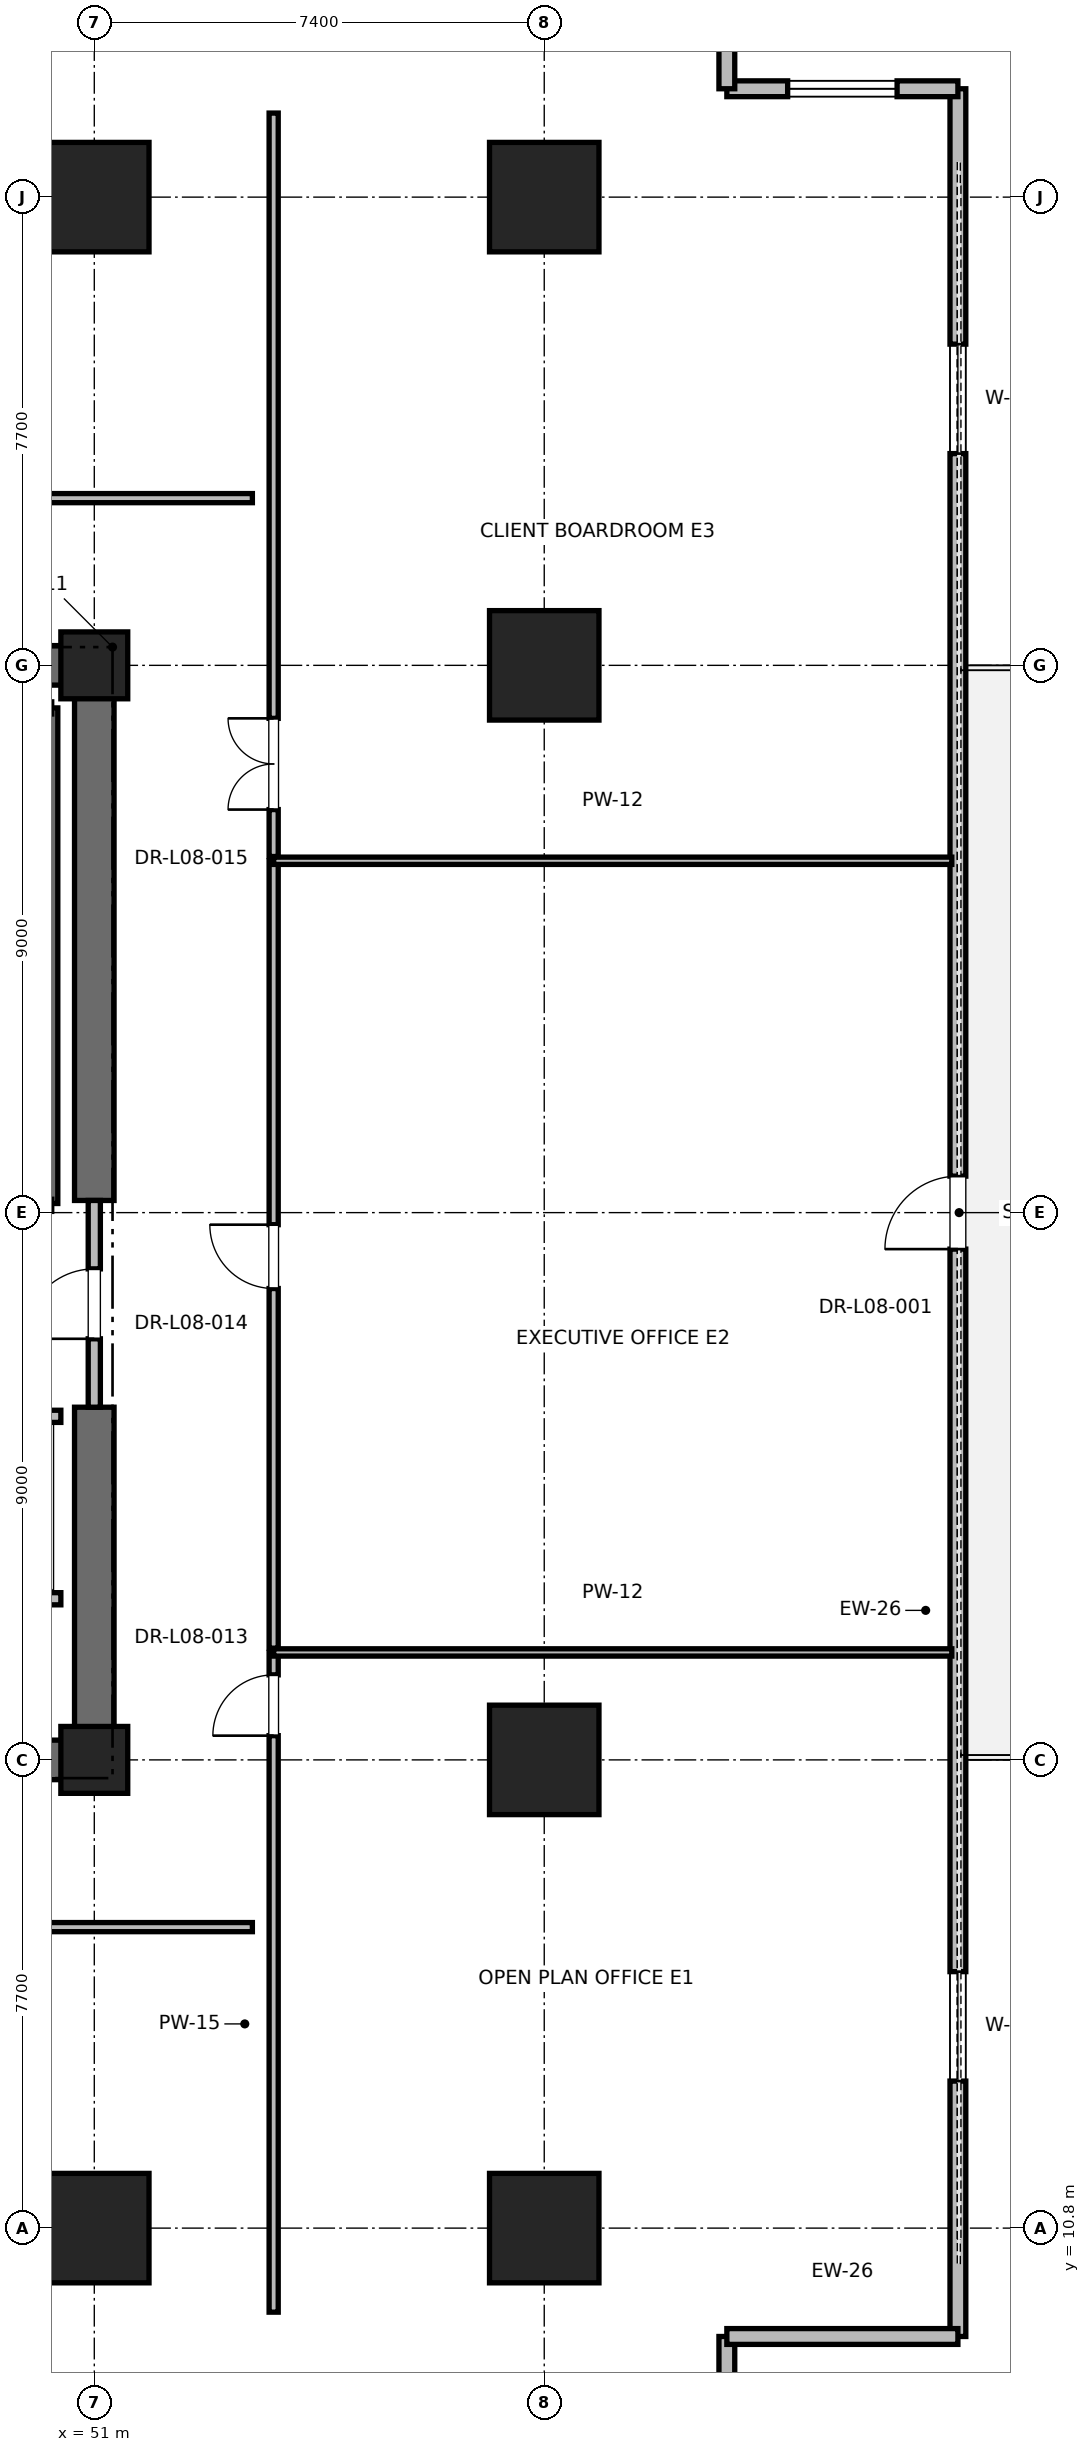
"""IFC4 building model, lengths in metres.
Left out: names, types, materials, properties, quantities, classifications, styles, units other than length and angle.
Written with IfcOpenShell. Run it as: python <this file> out.ifc"""

import sys

from ifc_helpers import new_model, si_unit, direction, frame, frame_2d, origin, origin_2d, place, context, subcontext, project, spatial, rectangle, extrude, element, fill, save


model = new_model("IFC4")
c1 = context("Model", 3, precision=1e-05, world=origin(), true_north=direction((0.0, 1.0)))
c2 = subcontext(c1, "Body", "Model", "MODEL_VIEW")
j1 = project(units=[si_unit("LENGTHUNIT", "METRE"), si_unit("PLANEANGLEUNIT", "RADIAN")], contexts=[c1])
p1 = place(None, origin())
s1 = spatial("IfcSite", under=j1, at=p1, CompositionType="ELEMENT")
p2 = place(p1, origin())
s2 = spatial("IfcBuilding", under=s1, at=p2, CompositionType="ELEMENT")
p3 = place(p2, frame((0.0, 0.0, 39.6)))
s3 = spatial("IfcBuildingStorey", under=s2, at=p3, CompositionType="ELEMENT", Elevation=39.6)
for number, where, z_axis, x_axis in (
    (1, (51.0, 10.8, 0.0), (0.0, 0.0, 1.0), (1.0, 0.0, 0.0)),
    (2, (51.0, 44.2, 0.0), (0.0, 0.0, 1.0), (1.0, 0.0, 0.0)),
    (3, (58.4, 18.5, 0.0), (0.0, 0.0, 1.0), (1.0, 0.0, 0.0)),
    (4, (58.4, 36.5, 0.0), (0.0, 0.0, 1.0), (1.0, 0.0, 0.0)),
    (5, (58.4, 10.8, 0.0), (0.0, 0.0, 1.0), (1.0, 0.0, 0.0)),
    (6, (58.4, 44.2, 0.0), (0.0, 0.0, 1.0), (1.0, 0.0, 0.0)),
):
    element("IfcColumn", number, at=place(p3, frame(where, z_axis=z_axis, x_axis=x_axis)), inside=s3, PredefinedType="COLUMN", context=c2, shape_type="SweptSolid", body=[
        extrude(rectangle(XDim=1.8, YDim=1.8, at=origin_2d()), origin(), (0.0, 0.0, 1.0), 4.0),
    ])
for number, where, z_axis, x_axis in (
    (7, (51.0, 18.5, 0.0), (0.0, 0.0, 1.0), (1.0, 0.0, 0.0)),
    (8, (51.0, 36.5, 0.0), (0.0, 0.0, 1.0), (1.0, 0.0, 0.0)),
):
    element("IfcColumn", number, at=place(p3, frame(where, z_axis=z_axis, x_axis=x_axis)), inside=s3, PredefinedType="PILASTER", context=c2, shape_type="SweptSolid", body=[
        extrude(rectangle(XDim=1.1, YDim=1.1, at=origin_2d()), origin(), (0.0, 0.0, 1.0), 4.0),
    ])
p4 = place(p3, frame((41.8, 18.5, 0.0), z_axis=(0.0, 0.0, 1.0), x_axis=(1.0, 0.0, 0.0)))
e9 = element("IfcWall", 9, at=p4, inside=s3, PredefinedType="SHEAR", context=c2, shape_type="SweptSolid", body=[
    extrude(rectangle(XDim=9.2, YDim=0.65, at=frame_2d((4.6, 0.0))), origin(), (0.0, 0.0, 1.0), 3.76),
])
for number, where, z_axis, x_axis in (
    (10, (45.2, 36.5, 0.0), (0.0, 0.0, 1.0), (1.0, 0.0, 0.0)),
    (11, (51.0, 18.5, 0.0), (0.0, 0.0, 1.0), (0.0, 1.0, 0.0)),
):
    element("IfcWall", number, at=place(p3, frame(where, z_axis=z_axis, x_axis=x_axis)), inside=s3, PredefinedType="SHEAR", context=c2, shape_type="SweptSolid", body=[
        extrude(rectangle(XDim=5.8, YDim=0.65, at=frame_2d((2.9, 0.0))), origin(), (0.0, 0.0, 1.0), 3.76),
    ])
p5 = place(p3, frame((51.0, 27.7, 0.0), z_axis=(0.0, 0.0, 1.0), x_axis=(0.0, 1.0, 0.0)))
e12 = element("IfcWall", 12, at=p5, inside=s3, PredefinedType="SHEAR", context=c2, shape_type="SweptSolid", body=[
    extrude(rectangle(XDim=8.8, YDim=0.65, at=frame_2d((4.4, 0.0))), origin(), (0.0, 0.0, 1.0), 3.76),
])
p6 = place(p3, frame((65.203, 9.018, 0.0), z_axis=(0.0, 0.0, 1.0), x_axis=(0.0, 1.0, 0.0)))
e13 = element("IfcWall", 13, at=p6, inside=s3, PredefinedType="PARAPET", context=c2, shape_type="SweptSolid", body=[
    extrude(rectangle(XDim=36.964, YDim=0.26, at=frame_2d((18.482, 0.0))), origin(), (0.0, 0.0, 1.0), 2.889),
])
p7 = place(p6, frame((4.2, 0.0, 0.85)))
e14 = element("IfcOpeningElement", 14, at=p7, cuts=e13, PredefinedType="OPENING", context=c2, shape_type="SweptSolid", body=[
    extrude(rectangle(XDim=1.8, YDim=2.2, at=frame_2d((0.9, 1.1))), frame((0.0, 0.13, 0.0), z_axis=(0.0, -1.0, 0.0), x_axis=(1.0, 0.0, 0.0)), (0.0, 0.0, 1.0), 0.26),
])
p8 = place(p6, frame((17.882, 0.0, 0.0)))
e15 = element("IfcOpeningElement", 15, at=p8, cuts=e13, PredefinedType="OPENING", context=c2, shape_type="SweptSolid", body=[
    extrude(rectangle(XDim=1.2, YDim=2.2, at=frame_2d((0.6, 1.1))), frame((0.0, 0.13, 0.0), z_axis=(0.0, -1.0, 0.0), x_axis=(1.0, 0.0, 0.0)), (0.0, 0.0, 1.0), 0.26),
])
p9 = place(p6, frame((30.964, 0.0, 0.85)))
e16 = element("IfcOpeningElement", 16, at=p9, cuts=e13, PredefinedType="OPENING", context=c2, shape_type="SweptSolid", body=[
    extrude(rectangle(XDim=1.8, YDim=2.2, at=frame_2d((0.9, 1.1))), frame((0.0, 0.13, 0.0), z_axis=(0.0, -1.0, 0.0), x_axis=(1.0, 0.0, 0.0)), (0.0, 0.0, 1.0), 0.26),
])
p10 = place(p3, frame((61.403, 5.618, 0.0), z_axis=(0.0, 0.0, 1.0), x_axis=(0.0, 1.0, 0.0)))
e17 = element("IfcWall", 17, at=p10, inside=s3, PredefinedType="PARAPET", context=c2, shape_type="SweptSolid", body=[
    extrude(rectangle(XDim=3.4, YDim=0.26, at=frame_2d((1.7, 0.0))), origin(), (0.0, 0.0, 1.0), 3.76),
])
p11 = place(p10, frame((0.8, 0.0, 0.85)))
e18 = element("IfcOpeningElement", 18, at=p11, cuts=e17, PredefinedType="OPENING", context=c2, shape_type="SweptSolid", body=[
    extrude(rectangle(XDim=1.8, YDim=2.2, at=frame_2d((0.9, 1.1))), frame((0.0, 0.13, 0.0), z_axis=(0.0, -1.0, 0.0), x_axis=(1.0, 0.0, 0.0)), (0.0, 0.0, 1.0), 0.26),
])
p12 = place(p3, frame((61.403, 9.018, 0.0), z_axis=(0.0, 0.0, 1.0), x_axis=(1.0, 0.0, 0.0)))
e19 = element("IfcWall", 19, at=p12, inside=s3, PredefinedType="PARAPET", context=c2, shape_type="SweptSolid", body=[
    extrude(rectangle(XDim=3.8, YDim=0.26, at=frame_2d((1.9, 0.0))), origin(), (0.0, 0.0, 1.0), 3.76),
])
p13 = place(p3, frame((65.203, 45.982, 0.0), z_axis=(0.0, 0.0, 1.0), x_axis=(-1.0, 0.0, 0.0)))
e20 = element("IfcWall", 20, at=p13, inside=s3, PredefinedType="PARAPET", context=c2, shape_type="SweptSolid", body=[
    extrude(rectangle(XDim=3.8, YDim=0.26, at=frame_2d((1.9, 0.0))), origin(), (0.0, 0.0, 1.0), 3.76),
])
p14 = place(p13, frame((1.0, 0.0, 0.85)))
e21 = element("IfcOpeningElement", 21, at=p14, cuts=e20, PredefinedType="OPENING", context=c2, shape_type="SweptSolid", body=[
    extrude(rectangle(XDim=1.8, YDim=2.2, at=frame_2d((0.9, 1.1))), frame((0.0, 0.13, 0.0), z_axis=(0.0, -1.0, 0.0), x_axis=(1.0, 0.0, 0.0)), (0.0, 0.0, 1.0), 0.26),
])
p15 = place(p3, frame((61.403, 45.982, 0.0), z_axis=(0.0, 0.0, 1.0), x_axis=(0.0, 1.0, 0.0)))
e22 = element("IfcWall", 22, at=p15, inside=s3, PredefinedType="PARAPET", context=c2, shape_type="SweptSolid", body=[
    extrude(rectangle(XDim=3.4, YDim=0.26, at=frame_2d((1.7, 0.0))), origin(), (0.0, 0.0, 1.0), 3.76),
])
p16 = place(p3, frame((50.3, 27.65, 0.0), z_axis=(0.0, 0.0, 1.0), x_axis=(0.0, 1.0, 0.0)))
e23 = element("IfcWall", 23, at=p16, inside=s3, PredefinedType="SOLIDWALL", context=c2, shape_type="SweptSolid", body=[
    extrude(rectangle(XDim=8.15, YDim=0.2, at=frame_2d((4.075, 0.0))), origin(), (0.0, 0.0, 1.0), 3.76),
])
p17 = place(p3, frame((51.0, 24.3, 0.0), z_axis=(0.0, 0.0, 1.0), x_axis=(0.0, 1.0, 0.0)))
e24 = element("IfcWall", 24, at=p17, inside=s3, PredefinedType="PARTITIONING", context=c2, shape_type="SweptSolid", body=[
    extrude(rectangle(XDim=3.4, YDim=0.2, at=frame_2d((1.7, 0.0))), origin(), (0.0, 0.0, 1.0), 2.54),
])
p18 = place(p17, frame((1.125, 0.0, 0.0)))
e25 = element("IfcOpeningElement", 25, at=p18, cuts=e24, PredefinedType="OPENING", context=c2, shape_type="SweptSolid", body=[
    extrude(rectangle(XDim=1.15, YDim=2.2, at=frame_2d((0.575, 1.1))), frame((0.0, 0.1, 0.0), z_axis=(0.0, -1.0, 0.0), x_axis=(1.0, 0.0, 0.0)), (0.0, 0.0, 1.0), 0.2),
])
p19 = place(p3, frame((47.85, 21.15, 0.0), z_axis=(0.0, 0.0, 1.0), x_axis=(1.0, 0.0, 0.0)))
e26 = element("IfcWall", 26, at=p19, inside=s3, PredefinedType="SOLIDWALL", context=c2, shape_type="SweptSolid", body=[
    extrude(rectangle(XDim=2.6, YDim=0.2, at=frame_2d((1.3, 0.0))), origin(), (0.0, 0.0, 1.0), 3.76),
])
p20 = place(p3, frame((50.45, 24.15, 0.0), z_axis=(0.0, 0.0, 1.0), x_axis=(-1.0, 0.0, 0.0)))
e27 = element("IfcWall", 27, at=p20, inside=s3, PredefinedType="SOLIDWALL", context=c2, shape_type="SweptSolid", body=[
    extrude(rectangle(XDim=2.6, YDim=0.2, at=frame_2d((1.3, 0.0))), origin(), (0.0, 0.0, 1.0), 2.54),
])
p21 = place(p20, frame((0.75, 0.0, 0.0)))
e28 = element("IfcOpeningElement", 28, at=p21, cuts=e27, PredefinedType="OPENING", context=c2, shape_type="SweptSolid", body=[
    extrude(rectangle(XDim=1.1, YDim=2.2, at=frame_2d((0.55, 1.1))), frame((0.0, 0.1, 0.0), z_axis=(0.0, -1.0, 0.0), x_axis=(1.0, 0.0, 0.0)), (0.0, 0.0, 1.0), 0.2),
])
p22 = place(p3, frame((43.878, 39.25, 0.0), z_axis=(0.0, 0.0, 1.0), x_axis=(1.0, 0.0, 0.0)))
e29 = element("IfcWall", 29, at=p22, inside=s3, PredefinedType="PARTITIONING", context=c2, shape_type="SweptSolid", body=[
    extrude(rectangle(XDim=9.722, YDim=0.15, at=frame_2d((4.861, 0.0))), origin(), (0.0, 0.0, 1.0), 2.85),
])
p23 = place(p22, frame((4.311, 0.0, 0.0)))
e30 = element("IfcOpeningElement", 30, at=p23, cuts=e29, PredefinedType="OPENING", context=c2, shape_type="SweptSolid", body=[
    extrude(rectangle(XDim=1.0, YDim=2.15, at=frame_2d((0.5, 1.075))), frame((0.0, 0.075, 0.0), z_axis=(0.0, -1.0, 0.0), x_axis=(1.0, 0.0, 0.0)), (0.0, 0.0, 1.0), 0.15),
])
p24 = place(p3, frame((38.982, 15.75, 0.0), z_axis=(0.0, 0.0, 1.0), x_axis=(1.0, 0.0, 0.0)))
e31 = element("IfcWall", 31, at=p24, inside=s3, PredefinedType="PARTITIONING", context=c2, shape_type="SweptSolid", body=[
    extrude(rectangle(XDim=14.618, YDim=0.15, at=frame_2d((7.309, 0.0))), origin(), (0.0, 0.0, 1.0), 2.85),
])
p25 = place(p24, frame((6.759, 0.0, 0.0)))
e32 = element("IfcOpeningElement", 32, at=p25, cuts=e31, PredefinedType="OPENING", context=c2, shape_type="SweptSolid", body=[
    extrude(rectangle(XDim=1.0, YDim=2.15, at=frame_2d((0.5, 1.075))), frame((0.0, 0.075, 0.0), z_axis=(0.0, -1.0, 0.0), x_axis=(1.0, 0.0, 0.0)), (0.0, 0.0, 1.0), 0.15),
])
p26 = place(p3, frame((53.95, 9.418, 0.0), z_axis=(0.0, 0.0, 1.0), x_axis=(0.0, 1.0, 0.0)))
e33 = element("IfcWall", 33, at=p26, inside=s3, PredefinedType="PARTITIONING", context=c2, shape_type="SweptSolid", body=[
    extrude(rectangle(XDim=10.849, YDim=0.15, at=frame_2d((5.425, 0.0))), origin(), (0.0, 0.0, 1.0), 2.85),
])
p27 = place(p26, frame((9.481, 0.0, 0.0)))
e34 = element("IfcOpeningElement", 34, at=p27, cuts=e33, PredefinedType="OPENING", context=c2, shape_type="SweptSolid", body=[
    extrude(rectangle(XDim=1.0, YDim=2.15, at=frame_2d((0.5, 1.075))), frame((0.0, 0.075, 0.0), z_axis=(0.0, -1.0, 0.0), x_axis=(1.0, 0.0, 0.0)), (0.0, 0.0, 1.0), 0.15),
])
p28 = place(p3, frame((53.95, 20.267, 0.0), z_axis=(0.0, 0.0, 1.0), x_axis=(1.0, 0.0, 0.0)))
e35 = element("IfcWall", 35, at=p28, inside=s3, PredefinedType="PARTITIONING", context=c2, shape_type="SweptSolid", body=[
    extrude(rectangle(XDim=11.153, YDim=0.12, at=frame_2d((5.577, 0.0))), origin(), (0.0, 0.0, 1.0), 2.85),
])
p29 = place(p3, frame((53.95, 20.337, 0.0), z_axis=(0.0, 0.0, 1.0), x_axis=(0.0, 1.0, 0.0)))
e36 = element("IfcWall", 36, at=p29, inside=s3, PredefinedType="PARTITIONING", context=c2, shape_type="SweptSolid", body=[
    extrude(rectangle(XDim=12.949, YDim=0.15, at=frame_2d((6.475, 0.0))), origin(), (0.0, 0.0, 1.0), 2.85),
])
p30 = place(p29, frame((5.915, 0.0, 0.0)))
e37 = element("IfcOpeningElement", 37, at=p30, cuts=e36, PredefinedType="OPENING", context=c2, shape_type="SweptSolid", body=[
    extrude(rectangle(XDim=1.05, YDim=2.2, at=frame_2d((0.525, 1.1))), frame((0.0, 0.075, 0.0), z_axis=(0.0, -1.0, 0.0), x_axis=(1.0, 0.0, 0.0)), (0.0, 0.0, 1.0), 0.15),
])
p31 = place(p3, frame((53.95, 33.286, 0.0), z_axis=(0.0, 0.0, 1.0), x_axis=(1.0, 0.0, 0.0)))
e38 = element("IfcWall", 38, at=p31, inside=s3, PredefinedType="PARTITIONING", context=c2, shape_type="SweptSolid", body=[
    extrude(rectangle(XDim=11.153, YDim=0.12, at=frame_2d((5.577, 0.0))), origin(), (0.0, 0.0, 1.0), 2.85),
])
p32 = place(p3, frame((53.95, 33.356, 0.0), z_axis=(0.0, 0.0, 1.0), x_axis=(0.0, 1.0, 0.0)))
e39 = element("IfcWall", 39, at=p32, inside=s3, PredefinedType="PARTITIONING", context=c2, shape_type="SweptSolid", body=[
    extrude(rectangle(XDim=12.226, YDim=0.15, at=frame_2d((6.113, 0.0))), origin(), (0.0, 0.0, 1.0), 2.85),
])
p33 = place(p32, frame((0.772, 0.0, 0.0)))
e40 = element("IfcOpeningElement", 40, at=p33, cuts=e39, PredefinedType="OPENING", context=c2, shape_type="SweptSolid", body=[
    extrude(rectangle(XDim=1.5, YDim=2.25, at=frame_2d((0.75, 1.125))), frame((0.0, 0.075, 0.0), z_axis=(0.0, -1.0, 0.0), x_axis=(1.0, 0.0, 0.0)), (0.0, 0.0, 1.0), 0.15),
])
p34 = place(p7, origin())
e41 = element("IfcWindow", 41, at=p34, inside=s3, PartitioningType="SINGLE_PANEL", PredefinedType="WINDOW", context=c2, shape_type="SweptSolid", body=[
    extrude(rectangle(XDim=1.8, YDim=2.2, at=frame_2d((0.9, 1.1))), frame((0.0, 0.03, 0.0), z_axis=(0.0, -1.0, 0.0), x_axis=(1.0, 0.0, 0.0)), (0.0, 0.0, 1.0), 0.06),
])
fill(e14, e41)
p35 = place(p8, origin())
e42 = element("IfcDoor", 42, at=p35, inside=s3, OperationType="SINGLE_SWING_LEFT", PredefinedType="DOOR", context=c2, shape_type="SweptSolid", body=[
    extrude(rectangle(XDim=1.2, YDim=2.2, at=frame_2d((0.6, 1.1))), frame((0.0, 0.025, 0.0), z_axis=(0.0, -1.0, 0.0), x_axis=(1.0, 0.0, 0.0)), (0.0, 0.0, 1.0), 0.05),
])
fill(e15, e42)
p36 = place(p9, origin())
e43 = element("IfcWindow", 43, at=p36, inside=s3, PartitioningType="SINGLE_PANEL", PredefinedType="WINDOW", context=c2, shape_type="SweptSolid", body=[
    extrude(rectangle(XDim=1.8, YDim=2.2, at=frame_2d((0.9, 1.1))), frame((0.0, 0.03, 0.0), z_axis=(0.0, -1.0, 0.0), x_axis=(1.0, 0.0, 0.0)), (0.0, 0.0, 1.0), 0.06),
])
fill(e16, e43)
p37 = place(p14, origin())
e44 = element("IfcWindow", 44, at=p37, inside=s3, PartitioningType="SINGLE_PANEL", PredefinedType="WINDOW", context=c2, shape_type="SweptSolid", body=[
    extrude(rectangle(XDim=1.8, YDim=2.2, at=frame_2d((0.9, 1.1))), frame((0.0, 0.03, 0.0), z_axis=(0.0, -1.0, 0.0), x_axis=(1.0, 0.0, 0.0)), (0.0, 0.0, 1.0), 0.06),
])
fill(e21, e44)
p38 = place(p18, origin())
e45 = element("IfcDoor", 45, at=p38, inside=s3, OperationType="SINGLE_SWING_LEFT", PredefinedType="DOOR", context=c2, shape_type="SweptSolid", body=[
    extrude(rectangle(XDim=1.15, YDim=2.2, at=frame_2d((0.575, 1.1))), frame((0.0, 0.025, 0.0), z_axis=(0.0, -1.0, 0.0), x_axis=(1.0, 0.0, 0.0)), (0.0, 0.0, 1.0), 0.05),
])
fill(e25, e45)
p39 = place(p27, origin())
e46 = element("IfcDoor", 46, at=p39, inside=s3, OperationType="SINGLE_SWING_LEFT", PredefinedType="DOOR", context=c2, shape_type="SweptSolid", body=[
    extrude(rectangle(XDim=1.0, YDim=2.15, at=frame_2d((0.5, 1.075))), frame((0.0, 0.025, 0.0), z_axis=(0.0, -1.0, 0.0), x_axis=(1.0, 0.0, 0.0)), (0.0, 0.0, 1.0), 0.05),
])
fill(e34, e46)
p40 = place(p30, origin())
e47 = element("IfcDoor", 47, at=p40, inside=s3, OperationType="SINGLE_SWING_RIGHT", PredefinedType="DOOR", context=c2, shape_type="SweptSolid", body=[
    extrude(rectangle(XDim=1.05, YDim=2.2, at=frame_2d((0.525, 1.1))), frame((0.0, 0.025, 0.0), z_axis=(0.0, -1.0, 0.0), x_axis=(1.0, 0.0, 0.0)), (0.0, 0.0, 1.0), 0.05),
])
fill(e37, e47)
p41 = place(p33, origin())
e48 = element("IfcDoor", 48, at=p41, inside=s3, OperationType="DOUBLE_DOOR_SINGLE_SWING", PredefinedType="DOOR", context=c2, shape_type="SweptSolid", body=[
    extrude(rectangle(XDim=1.5, YDim=2.25, at=frame_2d((0.75, 1.125))), frame((0.0, 0.025, 0.0), z_axis=(0.0, -1.0, 0.0), x_axis=(1.0, 0.0, 0.0)), (0.0, 0.0, 1.0), 0.05),
])
fill(e40, e48)
save(model, sys.argv[1])
